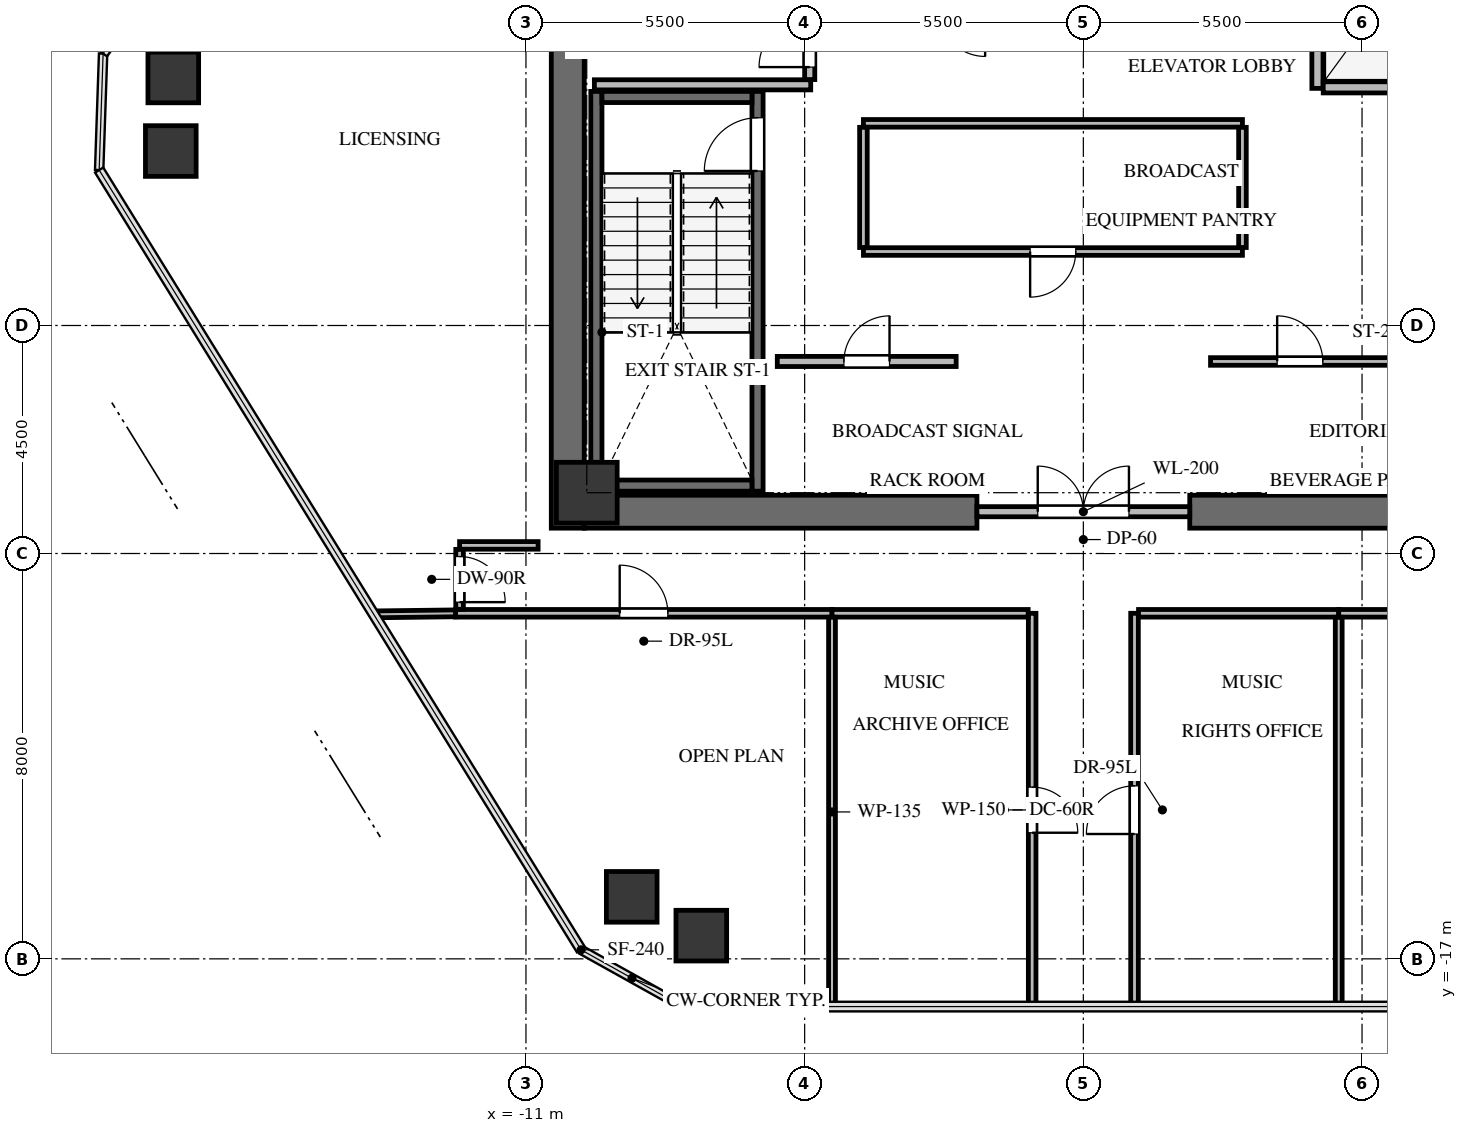
"""IFC4 building model, lengths in metres.
Left out: names, types, materials, properties, quantities, classifications, styles, units other than length and angle.
Written with IfcOpenShell. Run it as: python <this file> out.ifc"""

import sys

from ifc_helpers import new_model, si_unit, direction, frame, frame_2d, origin, origin_2d, place, context, subcontext, project, spatial, rectangle, extrude, source, transform, mapped, element, fill, save


model = new_model("IFC4")
c1 = context("Model", 3, precision=1e-05, world=origin(), true_north=direction((0.0, 1.0)))
c2 = subcontext(c1, "Body", "Model", "MODEL_VIEW")
j1 = project(units=[si_unit("LENGTHUNIT", "METRE"), si_unit("PLANEANGLEUNIT", "RADIAN")], contexts=[c1])
p1 = place(None, origin())
s1 = spatial("IfcSite", under=j1, at=p1, CompositionType="ELEMENT")
p2 = place(p1, origin())
s2 = spatial("IfcBuilding", under=s1, at=p2, CompositionType="ELEMENT")
p3 = place(p2, frame((0.0, 0.0, 209.2)))
s3 = spatial("IfcBuildingStorey", under=s2, at=p3, CompositionType="ELEMENT", Elevation=209.2)
p4 = place(p3, frame((-10.175, -8.5, 0.0), z_axis=(0.0, 0.0, 1.0), x_axis=(0.0, 1.0, 0.0)))
e1 = element("IfcWall", 1, at=p4, inside=s3, PredefinedType="SHEAR", context=c2, shape_type="SweptSolid", body=[
    extrude(rectangle(XDim=17.0, YDim=0.65, at=frame_2d((8.5, 0.0))), origin(), (0.0, 0.0, 1.0), 4.2),
])
for number, where, z_axis, x_axis in (
    (2, (-9.85, -8.175, 0.0), (0.0, 0.0, 1.0), (1.0, 0.0, 0.0)),
    (3, (2.1, -8.175, 0.0), (0.0, 0.0, 1.0), (1.0, 0.0, 0.0)),
):
    element("IfcWall", number, at=place(p3, frame(where, z_axis=z_axis, x_axis=x_axis)), inside=s3, PredefinedType="SHEAR", context=c2, shape_type="SweptSolid", body=[
        extrude(rectangle(XDim=7.75, YDim=0.65, at=frame_2d((3.875, 0.0))), origin(), (0.0, 0.0, 1.0), 4.2),
    ])
p5 = place(p3, frame((-6.43, -7.77, -0.24), z_axis=(0.0, 0.0, 1.0), x_axis=(0.0, 1.0, 0.0)))
e4 = element("IfcWall", 4, at=p5, inside=s3, PredefinedType="SHEAR", context=c2, shape_type="SweptSolid", body=[
    extrude(rectangle(XDim=7.89, YDim=0.22, at=frame_2d((3.945, 0.0))), origin(), (0.0, 0.0, 1.0), 4.14),
])
p6 = place(p5, frame((6.32, 0.0, 0.0)))
e5 = element("IfcOpeningElement", 5, at=p6, cuts=e4, PredefinedType="OPENING", context=c2, shape_type="SweptSolid", body=[
    extrude(rectangle(XDim=1.05, YDim=2.15, at=frame_2d((0.525, 1.075))), frame((0.0, 0.12, 0.0), z_axis=(0.0, -1.0, 0.0), x_axis=(1.0, 0.0, 0.0)), (0.0, 0.0, 1.0), 0.24),
])
p7 = place(p3, frame((-9.61, 0.12, -0.24), z_axis=(0.0, 0.0, 1.0), x_axis=(0.0, -1.0, 0.0)))
e6 = element("IfcWall", 6, at=p7, inside=s3, PredefinedType="SHEAR", context=c2, shape_type="SweptSolid", body=[
    extrude(rectangle(XDim=7.89, YDim=0.22, at=frame_2d((3.945, 0.0))), origin(), (0.0, 0.0, 1.0), 4.14),
])
for number, where, z_axis, x_axis in (
    (7, (-9.5, -7.66, -0.24), (0.0, 0.0, 1.0), (1.0, 0.0, 0.0)),
    (8, (-6.54, 0.01, -0.24), (0.0, 0.0, 1.0), (-1.0, 0.0, 0.0)),
):
    element("IfcWall", number, at=place(p3, frame(where, z_axis=z_axis, x_axis=x_axis)), inside=s3, PredefinedType="SHEAR", context=c2, shape_type="SweptSolid", body=[
        extrude(rectangle(XDim=2.96, YDim=0.22, at=frame_2d((1.48, 0.0))), origin(), (0.0, 0.0, 1.0), 4.14),
    ])
m1 = source(origin(), c2, "Body", "SweptSolid", [
    extrude(rectangle(XDim=1.2, YDim=1.2, at=origin_2d()), origin(), (0.0, 0.0, 1.0), 4.14),
])
p8 = place(p3, frame((-9.8, -7.8, -0.24), z_axis=(0.0, 0.0, 1.0), x_axis=(1.0, 0.0, 0.0)))
e9 = element("IfcColumn", 9, at=p8, inside=s3, PredefinedType="COLUMN", context=c2, shape_type="MappedRepresentation", body=[
    mapped(m1, transform((0.0, 0.0, 0.0), x_axis=(1.0, 0.0, 0.0), y_axis=(0.0, 1.0, 0.0), z_axis=(0.0, 0.0, 1.0), scale=1.0)),
])
m2 = source(origin(), c2, "Body", "SweptSolid", [
    extrude(rectangle(XDim=1.0, YDim=1.0, at=origin_2d()), origin(), (0.0, 0.0, 1.0), 4.14),
])
for number, where, z_axis, x_axis in (
    (10, (-8.913, -15.776, -0.24), (0.0, 0.0, 1.0), (1.0, 0.0, 0.0)),
    (11, (-18.009, -1.057, -0.24), (0.0, 0.0, 1.0), (1.0, 0.0, 0.0)),
    (12, (-17.96, 0.396, -0.24), (0.0, 0.0, 1.0), (1.0, 0.0, 0.0)),
    (13, (-7.54, -16.542, -0.24), (0.0, 0.0, 1.0), (1.0, 0.0, 0.0)),
):
    element("IfcColumn", number, at=place(p3, frame(where, z_axis=z_axis, x_axis=x_axis)), inside=s3, PredefinedType="COLUMN", context=c2, shape_type="MappedRepresentation", body=[
        mapped(m2, transform((0.0, 0.0, 0.0), x_axis=(1.0, 0.0, 0.0), y_axis=(0.0, 1.0, 0.0), z_axis=(0.0, 0.0, 1.0), scale=1.0)),
    ])
p9 = place(p3, frame((-2.1, -8.175, 0.0), z_axis=(0.0, 0.0, 1.0), x_axis=(1.0, 0.0, 0.0)))
e14 = element("IfcWall", 14, at=p9, inside=s3, PredefinedType="SOLIDWALL", context=c2, shape_type="SweptSolid", body=[
    extrude(rectangle(XDim=4.2, YDim=0.2, at=frame_2d((2.1, 0.0))), origin(), (0.0, 0.0, 1.0), 3.885),
])
p10 = place(p9, frame((1.2, 0.0, 0.0)))
e15 = element("IfcOpeningElement", 15, at=p10, cuts=e14, PredefinedType="OPENING", context=c2, shape_type="SweptSolid", body=[
    extrude(rectangle(XDim=1.8, YDim=2.15, at=frame_2d((0.9, 1.075))), frame((0.0, 0.11, 0.0), z_axis=(0.0, -1.0, 0.0), x_axis=(1.0, 0.0, 0.0)), (0.0, 0.0, 1.0), 0.22),
])
p11 = place(p3, frame((-9.65, 0.25, 0.0), z_axis=(0.0, 0.0, 1.0), x_axis=(1.0, 0.0, 0.0)))
e16 = element("IfcWall", 16, at=p11, inside=s3, PredefinedType="SOLIDWALL", context=c2, shape_type="SweptSolid", body=[
    extrude(rectangle(XDim=4.27, YDim=0.2, at=frame_2d((2.135, 0.0))), origin(), (0.0, 0.0, 1.0), 3.885),
])
p12 = place(p3, frame((-5.4, 0.354, 0.0), z_axis=(0.0, 0.0, 1.0), x_axis=(0.0, 1.0, 0.0)))
e17 = element("IfcWall", 17, at=p12, inside=s3, PredefinedType="SOLIDWALL", context=c2, shape_type="SweptSolid", body=[
    extrude(rectangle(XDim=4.026, YDim=0.2, at=frame_2d((2.013, 0.0))), origin(), (0.0, 0.0, 1.0), 3.885),
])
p13 = place(p12, frame((0.246, 0.0, 0.0)))
e18 = element("IfcOpeningElement", 18, at=p13, cuts=e17, PredefinedType="OPENING", context=c2, shape_type="SweptSolid", body=[
    extrude(rectangle(XDim=1.0, YDim=2.15, at=frame_2d((0.5, 1.075))), frame((0.0, 0.11, 0.0), z_axis=(0.0, -1.0, 0.0), x_axis=(1.0, 0.0, 0.0)), (0.0, 0.0, 1.0), 0.22),
])
p14 = place(p3, frame((4.62, 0.18, 0.0), z_axis=(0.0, 0.0, 1.0), x_axis=(0.0, 1.0, 0.0)))
e19 = element("IfcWall", 19, at=p14, inside=s3, PredefinedType="SOLIDWALL", context=c2, shape_type="SweptSolid", body=[
    extrude(rectangle(XDim=3.186, YDim=0.22, at=frame_2d((1.593, 0.0))), origin(), (0.0, 0.0, 1.0), 3.885),
])
p15 = place(p3, frame((4.734, 0.2, 0.0), z_axis=(0.0, 0.0, 1.0), x_axis=(1.0, 0.0, 0.0)))
e20 = element("IfcWall", 20, at=p15, inside=s3, PredefinedType="SOLIDWALL", context=c2, shape_type="SweptSolid", body=[
    extrude(rectangle(XDim=1.666, YDim=0.22, at=frame_2d((0.833, 0.0))), origin(), (0.0, 0.0, 1.0), 3.885),
])
p16 = place(p3, frame((-6.04, -5.21, 0.0), z_axis=(0.0, 0.0, 1.0), x_axis=(1.0, 0.0, 0.0)))
e21 = element("IfcWall", 21, at=p16, inside=s3, PredefinedType="SOLIDWALL", context=c2, shape_type="SweptSolid", body=[
    extrude(rectangle(XDim=3.53, YDim=0.2, at=frame_2d((1.765, 0.0))), origin(), (0.0, 0.0, 1.0), 3.885),
])
p17 = place(p16, frame((1.315, 0.0, 0.0)))
e22 = element("IfcOpeningElement", 22, at=p17, cuts=e21, PredefinedType="OPENING", context=c2, shape_type="SweptSolid", body=[
    extrude(rectangle(XDim=0.9, YDim=2.05, at=frame_2d((0.45, 1.025))), frame((0.0, 0.11, 0.0), z_axis=(0.0, -1.0, 0.0), x_axis=(1.0, 0.0, 0.0)), (0.0, 0.0, 1.0), 0.22),
])
p18 = place(p3, frame((2.51, -5.21, 0.0), z_axis=(0.0, 0.0, 1.0), x_axis=(1.0, 0.0, 0.0)))
e23 = element("IfcWall", 23, at=p18, inside=s3, PredefinedType="PARTITIONING", context=c2, shape_type="SweptSolid", body=[
    extrude(rectangle(XDim=3.53, YDim=0.15, at=frame_2d((1.765, 0.0))), origin(), (0.0, 0.0, 1.0), 3.885),
])
p19 = place(p18, frame((1.315, 0.0, 0.0)))
e24 = element("IfcOpeningElement", 24, at=p19, cuts=e23, PredefinedType="OPENING", context=c2, shape_type="SweptSolid", body=[
    extrude(rectangle(XDim=0.9, YDim=2.05, at=frame_2d((0.45, 1.025))), frame((0.0, 0.085, 0.0), z_axis=(0.0, -1.0, 0.0), x_axis=(1.0, 0.0, 0.0)), (0.0, 0.0, 1.0), 0.17),
])
p20 = place(p3, frame((3.14, -3.04, 0.0), z_axis=(0.0, 0.0, 1.0), x_axis=(-1.0, 0.0, 0.0)))
e25 = element("IfcWall", 25, at=p20, inside=s3, PredefinedType="PARTITIONING", context=c2, shape_type="SweptSolid", body=[
    extrude(rectangle(XDim=7.48, YDim=0.15, at=frame_2d((3.74, 0.0))), origin(), (0.0, 0.0, 1.0), 3.885),
])
p21 = place(p20, frame((3.29, 0.0, 0.0)))
e26 = element("IfcOpeningElement", 26, at=p21, cuts=e25, PredefinedType="OPENING", context=c2, shape_type="SweptSolid", body=[
    extrude(rectangle(XDim=0.9, YDim=2.05, at=frame_2d((0.45, 1.025))), frame((0.0, 0.085, 0.0), z_axis=(0.0, -1.0, 0.0), x_axis=(1.0, 0.0, 0.0)), (0.0, 0.0, 1.0), 0.17),
])
p22 = place(p3, frame((-4.34, -0.51, 0.0), z_axis=(0.0, 0.0, 1.0), x_axis=(1.0, 0.0, 0.0)))
e27 = element("IfcWall", 27, at=p22, inside=s3, PredefinedType="PARTITIONING", context=c2, shape_type="SweptSolid", body=[
    extrude(rectangle(XDim=7.48, YDim=0.15, at=frame_2d((3.74, 0.0))), origin(), (0.0, 0.0, 1.0), 3.885),
])
for number, where, z_axis, x_axis in (
    (28, (-4.34, -2.961, 0.0), (0.0, 0.0, 1.0), (0.0, 1.0, 0.0)),
    (29, (3.14, -0.589, 0.0), (0.0, 0.0, 1.0), (0.0, -1.0, 0.0)),
):
    element("IfcWall", number, at=place(p3, frame(where, z_axis=z_axis, x_axis=x_axis)), inside=s3, PredefinedType="PARTITIONING", context=c2, shape_type="SweptSolid", body=[
        extrude(rectangle(XDim=2.372, YDim=0.15, at=frame_2d((1.186, 0.0))), origin(), (0.0, 0.0, 1.0), 3.885),
    ])
p23 = place(p3, frame((-12.39, -10.18, 0.0), z_axis=(0.0, 0.0, 1.0), x_axis=(1.0, 0.0, 0.0)))
e30 = element("IfcWall", 30, at=p23, inside=s3, PredefinedType="PARTITIONING", context=c2, shape_type="SweptSolid", body=[
    extrude(rectangle(XDim=7.43, YDim=0.15, at=frame_2d((3.715, 0.0))), origin(), (0.0, 0.0, 1.0), 2.47),
])
p24 = place(p23, frame((3.24, 0.0, 0.0)))
e31 = element("IfcOpeningElement", 31, at=p24, cuts=e30, PredefinedType="OPENING", context=c2, shape_type="SweptSolid", body=[
    extrude(rectangle(XDim=0.95, YDim=2.1, at=frame_2d((0.475, 1.05))), frame((0.0, 0.085, 0.0), z_axis=(0.0, -1.0, 0.0), x_axis=(1.0, 0.0, 0.0)), (0.0, 0.0, 1.0), 0.17),
])
p25 = place(p3, frame((-1.01, -10.18, 0.0), z_axis=(0.0, 0.0, 1.0), x_axis=(0.0, -1.0, 0.0)))
e32 = element("IfcWall", 32, at=p25, inside=s3, PredefinedType="PARTITIONING", context=c2, shape_type="SweptSolid", body=[
    extrude(rectangle(XDim=7.762, YDim=0.15, at=frame_2d((3.881, 0.0))), origin(), (0.0, 0.0, 1.0), 2.47),
])
p26 = place(p25, frame((3.431, 0.0, 0.0)))
e33 = element("IfcOpeningElement", 33, at=p26, cuts=e32, PredefinedType="OPENING", context=c2, shape_type="SweptSolid", body=[
    extrude(rectangle(XDim=0.9, YDim=2.05, at=frame_2d((0.45, 1.025))), frame((0.0, 0.085, 0.0), z_axis=(0.0, -1.0, 0.0), x_axis=(1.0, 0.0, 0.0)), (0.0, 0.0, 1.0), 0.17),
])
p27 = place(p3, frame((-4.96, -10.18, 0.0), z_axis=(0.0, 0.0, 1.0), x_axis=(1.0, 0.0, 0.0)))
e34 = element("IfcWall", 34, at=p27, inside=s3, PredefinedType="PARTITIONING", context=c2, shape_type="SweptSolid", body=[
    extrude(rectangle(XDim=3.871, YDim=0.15, at=frame_2d((1.936, 0.0))), origin(), (0.0, 0.0, 1.0), 2.47),
])
p28 = place(p3, frame((1.01, -17.942, 0.0), z_axis=(0.0, 0.0, 1.0), x_axis=(0.0, 1.0, 0.0)))
e35 = element("IfcWall", 35, at=p28, inside=s3, PredefinedType="PARTITIONING", context=c2, shape_type="SweptSolid", body=[
    extrude(rectangle(XDim=7.762, YDim=0.15, at=frame_2d((3.881, 0.0))), origin(), (0.0, 0.0, 1.0), 2.47),
])
p29 = place(p28, frame((3.406, 0.0, 0.0)))
e36 = element("IfcOpeningElement", 36, at=p29, cuts=e35, PredefinedType="OPENING", context=c2, shape_type="SweptSolid", body=[
    extrude(rectangle(XDim=0.95, YDim=2.1, at=frame_2d((0.475, 1.05))), frame((0.0, 0.085, 0.0), z_axis=(0.0, -1.0, 0.0), x_axis=(1.0, 0.0, 0.0)), (0.0, 0.0, 1.0), 0.17),
])
p30 = place(p3, frame((1.089, -10.18, 0.0), z_axis=(0.0, 0.0, 1.0), x_axis=(1.0, 0.0, 0.0)))
e37 = element("IfcWall", 37, at=p30, inside=s3, PredefinedType="PARTITIONING", context=c2, shape_type="SweptSolid", body=[
    extrude(rectangle(XDim=3.951, YDim=0.15, at=frame_2d((1.976, 0.0))), origin(), (0.0, 0.0, 1.0), 2.47),
])
p31 = place(p3, frame((5.04, -10.18, 0.0), z_axis=(0.0, 0.0, 1.0), x_axis=(1.0, 0.0, 0.0)))
e38 = element("IfcWall", 38, at=p31, inside=s3, PredefinedType="PARTITIONING", context=c2, shape_type="SweptSolid", body=[
    extrude(rectangle(XDim=7.22, YDim=0.15, at=frame_2d((3.61, 0.0))), origin(), (0.0, 0.0, 1.0), 2.47),
])
p32 = place(p31, frame((3.15, 0.0, 0.0)))
e39 = element("IfcOpeningElement", 39, at=p32, cuts=e38, PredefinedType="OPENING", context=c2, shape_type="SweptSolid", body=[
    extrude(rectangle(XDim=0.92, YDim=2.1, at=frame_2d((0.46, 1.05))), frame((0.0, 0.085, 0.0), z_axis=(0.0, -1.0, 0.0), x_axis=(1.0, 0.0, 0.0)), (0.0, 0.0, 1.0), 0.17),
])
p33 = place(p3, frame((-10.76, -8.84, 0.0), z_axis=(0.0, 0.0, 1.0), x_axis=(-1.0, 0.0, 0.0)))
e40 = element("IfcWall", 40, at=p33, inside=s3, PredefinedType="PARTITIONING", context=c2, shape_type="SweptSolid", body=[
    extrude(rectangle(XDim=1.55, YDim=0.15, at=frame_2d((0.775, 0.0))), origin(), (0.0, 0.0, 1.0), 3.885),
])
p34 = place(p3, frame((-12.31, -8.919, 0.0), z_axis=(0.0, 0.0, 1.0), x_axis=(0.0, -1.0, 0.0)))
e41 = element("IfcWall", 41, at=p34, inside=s3, PredefinedType="PARTITIONING", context=c2, shape_type="SweptSolid", body=[
    extrude(rectangle(XDim=1.182, YDim=0.15, at=frame_2d((0.591, 0.0))), origin(), (0.0, 0.0, 1.0), 2.47),
])
p35 = place(p34, frame((0.141, 0.0, 0.0)))
e42 = element("IfcOpeningElement", 42, at=p35, cuts=e41, PredefinedType="OPENING", context=c2, shape_type="SweptSolid", body=[
    extrude(rectangle(XDim=0.9, YDim=2.05, at=frame_2d((0.45, 1.025))), frame((0.0, 0.085, 0.0), z_axis=(0.0, -1.0, 0.0), x_axis=(1.0, 0.0, 0.0)), (0.0, 0.0, 1.0), 0.17),
])
p36 = place(p3, frame((-4.96, -10.259, 0.0), z_axis=(0.0, 0.0, 1.0), x_axis=(0.0, -1.0, 0.0)))
e43 = element("IfcWall", 43, at=p36, inside=s3, PredefinedType="PARTITIONING", context=c2, shape_type="SweptSolid", body=[
    extrude(rectangle(XDim=7.683, YDim=0.135, at=frame_2d((3.841, 0.0))), origin(), (0.0, 0.0, 1.0), 2.47),
])
p37 = place(p3, frame((-14.004, -10.201, 0.0), z_axis=(0.0, 0.0, 1.0), x_axis=(0.999923084603, 0.012402615782, 0.0)))
e44 = element("IfcWall", 44, at=p37, inside=s3, PredefinedType="PARTITIONING", context=c2, shape_type="SweptSolid", body=[
    extrude(rectangle(XDim=1.614, YDim=0.135, at=frame_2d((0.807, 0.0))), origin(), (0.0, 0.0, 1.0), 2.47),
])
p38 = place(p3, frame((5.04, -10.259, 0.0), z_axis=(0.0, 0.0, 1.0), x_axis=(0.0, -1.0, 0.0)))
e45 = element("IfcWall", 45, at=p38, inside=s3, PredefinedType="PARTITIONING", context=c2, shape_type="SweptSolid", body=[
    extrude(rectangle(XDim=7.683, YDim=0.135, at=frame_2d((3.841, 0.0))), origin(), (0.0, 0.0, 1.0), 2.47),
])
m3 = source(origin(), c2, "Body", "SweptSolid", [
    extrude(rectangle(XDim=1.05, YDim=2.15, at=frame_2d((0.525, 1.075))), frame((0.0, 0.025, 0.0), z_axis=(0.0, -1.0, 0.0), x_axis=(1.0, 0.0, 0.0)), (0.0, 0.0, 1.0), 0.05),
])
p39 = place(p6, origin())
e46 = element("IfcDoor", 46, at=p39, inside=s3, OperationType="SINGLE_SWING_LEFT", PredefinedType="DOOR", context=c2, shape_type="MappedRepresentation", body=[
    mapped(m3, transform((0.0, 0.0, 0.0), x_axis=(1.0, 0.0, 0.0), y_axis=(0.0, 1.0, 0.0), z_axis=(0.0, 0.0, 1.0), scale=1.0)),
])
fill(e5, e46)
m4 = source(origin(), c2, "Body", "SweptSolid", [
    extrude(rectangle(XDim=1.8, YDim=2.15, at=frame_2d((0.9, 1.075))), frame((0.0, 0.025, 0.0), z_axis=(0.0, -1.0, 0.0), x_axis=(1.0, 0.0, 0.0)), (0.0, 0.0, 1.0), 0.05),
])
p40 = place(p10, origin())
e47 = element("IfcDoor", 47, at=p40, inside=s3, OperationType="DOUBLE_DOOR_SINGLE_SWING", PredefinedType="DOOR", context=c2, shape_type="MappedRepresentation", body=[
    mapped(m4, transform((0.0, 0.0, 0.0), x_axis=(1.0, 0.0, 0.0), y_axis=(0.0, 1.0, 0.0), z_axis=(0.0, 0.0, 1.0), scale=1.0)),
])
fill(e15, e47)
m5 = source(origin(), c2, "Body", "SweptSolid", [
    extrude(rectangle(XDim=1.0, YDim=2.15, at=frame_2d((0.5, 1.075))), frame((0.0, 0.025, 0.0), z_axis=(0.0, -1.0, 0.0), x_axis=(1.0, 0.0, 0.0)), (0.0, 0.0, 1.0), 0.05),
])
p41 = place(p13, origin())
e48 = element("IfcDoor", 48, at=p41, inside=s3, OperationType="SINGLE_SWING_LEFT", PredefinedType="DOOR", context=c2, shape_type="MappedRepresentation", body=[
    mapped(m5, transform((0.0, 0.0, 0.0), x_axis=(1.0, 0.0, 0.0), y_axis=(0.0, 1.0, 0.0), z_axis=(0.0, 0.0, 1.0), scale=1.0)),
])
fill(e18, e48)
m6 = source(origin(), c2, "Body", "SweptSolid", [
    extrude(rectangle(XDim=0.9, YDim=2.05, at=frame_2d((0.45, 1.025))), frame((0.0, 0.025, 0.0), z_axis=(0.0, -1.0, 0.0), x_axis=(1.0, 0.0, 0.0)), (0.0, 0.0, 1.0), 0.05),
])
p42 = place(p17, origin())
e49 = element("IfcDoor", 49, at=p42, inside=s3, OperationType="SINGLE_SWING_RIGHT", PredefinedType="DOOR", context=c2, shape_type="MappedRepresentation", body=[
    mapped(m6, transform((0.0, 0.0, 0.0), x_axis=(1.0, 0.0, 0.0), y_axis=(0.0, 1.0, 0.0), z_axis=(0.0, 0.0, 1.0), scale=1.0)),
])
fill(e22, e49)
m7 = source(origin(), c2, "Body", "SweptSolid", [
    extrude(rectangle(XDim=0.9, YDim=2.05, at=frame_2d((0.45, 1.025))), frame((0.0, 0.025, 0.0), z_axis=(0.0, -1.0, 0.0), x_axis=(1.0, 0.0, 0.0)), (0.0, 0.0, 1.0), 0.05),
])
p43 = place(p19, origin())
e50 = element("IfcDoor", 50, at=p43, inside=s3, OperationType="SINGLE_SWING_LEFT", PredefinedType="DOOR", context=c2, shape_type="MappedRepresentation", body=[
    mapped(m7, transform((0.0, 0.0, 0.0), x_axis=(1.0, 0.0, 0.0), y_axis=(0.0, 1.0, 0.0), z_axis=(0.0, 0.0, 1.0), scale=1.0)),
])
fill(e24, e50)
p44 = place(p21, origin())
e51 = element("IfcDoor", 51, at=p44, inside=s3, OperationType="SINGLE_SWING_RIGHT", PredefinedType="DOOR", context=c2, shape_type="MappedRepresentation", body=[
    mapped(m6, transform((0.0, 0.0, 0.0), x_axis=(1.0, 0.0, 0.0), y_axis=(0.0, 1.0, 0.0), z_axis=(0.0, 0.0, 1.0), scale=1.0)),
])
fill(e26, e51)
m8 = source(origin(), c2, "Body", "SweptSolid", [
    extrude(rectangle(XDim=0.95, YDim=2.1, at=frame_2d((0.475, 1.05))), frame((0.0, 0.025, 0.0), z_axis=(0.0, -1.0, 0.0), x_axis=(1.0, 0.0, 0.0)), (0.0, 0.0, 1.0), 0.05),
])
p45 = place(p24, origin())
e52 = element("IfcDoor", 52, at=p45, inside=s3, OperationType="SINGLE_SWING_LEFT", PredefinedType="DOOR", context=c2, shape_type="MappedRepresentation", body=[
    mapped(m8, transform((0.0, 0.0, 0.0), x_axis=(1.0, 0.0, 0.0), y_axis=(0.0, 1.0, 0.0), z_axis=(0.0, 0.0, 1.0), scale=1.0)),
])
fill(e31, e52)
p46 = place(p26, origin())
e53 = element("IfcDoor", 53, at=p46, inside=s3, OperationType="SINGLE_SWING_RIGHT", PredefinedType="DOOR", context=c2, shape_type="MappedRepresentation", body=[
    mapped(m6, transform((0.0, 0.0, 0.0), x_axis=(1.0, 0.0, 0.0), y_axis=(0.0, 1.0, 0.0), z_axis=(0.0, 0.0, 1.0), scale=1.0)),
])
fill(e33, e53)
p47 = place(p29, origin())
e54 = element("IfcDoor", 54, at=p47, inside=s3, OperationType="SINGLE_SWING_LEFT", PredefinedType="DOOR", context=c2, shape_type="MappedRepresentation", body=[
    mapped(m8, transform((0.0, 0.0, 0.0), x_axis=(1.0, 0.0, 0.0), y_axis=(0.0, 1.0, 0.0), z_axis=(0.0, 0.0, 1.0), scale=1.0)),
])
fill(e36, e54)
m9 = source(origin(), c2, "Body", "SweptSolid", [
    extrude(rectangle(XDim=0.9, YDim=2.05, at=frame_2d((0.45, 1.025))), frame((0.0, 0.025, 0.0), z_axis=(0.0, -1.0, 0.0), x_axis=(1.0, 0.0, 0.0)), (0.0, 0.0, 1.0), 0.05),
])
p48 = place(p35, origin())
e55 = element("IfcDoor", 55, at=p48, inside=s3, OperationType="SINGLE_SWING_RIGHT", PredefinedType="DOOR", context=c2, shape_type="MappedRepresentation", body=[
    mapped(m9, transform((0.0, 0.0, 0.0), x_axis=(1.0, 0.0, 0.0), y_axis=(0.0, 1.0, 0.0), z_axis=(0.0, 0.0, 1.0), scale=1.0)),
])
fill(e42, e55)
save(model, sys.argv[1])
